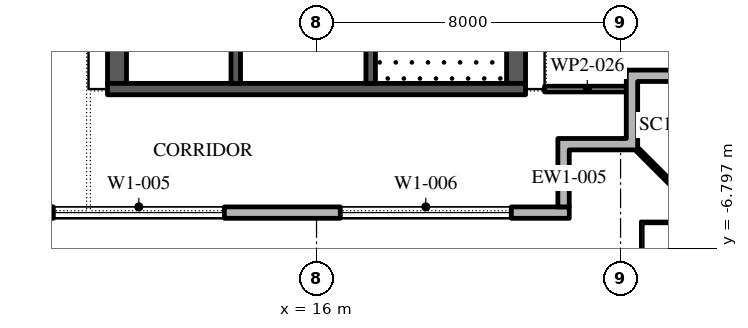
"""IFC4 building model, lengths in metres.
Left out: names, types, materials, properties, quantities, classifications, styles, units other than length and angle.
Written with IfcOpenShell. Run it as: python <this file> out.ifc"""

import sys

from ifc_helpers import new_model, si_unit, direction, frame, frame_2d, origin, place, context, subcontext, project, spatial, polyline, rectangle, outline, extrude, element, fill, save


model = new_model("IFC4")
c1 = context("Model", 3, precision=1e-05, world=origin(), true_north=direction((0.0, 1.0)))
c2 = subcontext(c1, "Body", "Model", "MODEL_VIEW")
j1 = project(units=[si_unit("LENGTHUNIT", "METRE"), si_unit("PLANEANGLEUNIT", "RADIAN")], contexts=[c1])
p1 = place(None, origin())
s1 = spatial("IfcSite", under=j1, at=p1, CompositionType="ELEMENT")
p2 = place(p1, origin())
s2 = spatial("IfcBuilding", under=s1, at=p2, CompositionType="ELEMENT")
p3 = place(p2, frame((0.0, 0.0, 317.4)))
s3 = spatial("IfcBuildingStorey", under=s2, at=p3, CompositionType="ELEMENT", Elevation=317.4)
p4 = place(p3, frame((-22.35, -5.85, 0.0), z_axis=(0.0, 0.0, 1.0), x_axis=(1.0, 0.0, 0.0)))
e1 = element("IfcWall", 1, at=p4, inside=s3, PredefinedType="STANDARD", context=c2, shape_type="SweptSolid", body=[
    extrude(rectangle(XDim=45.0, YDim=0.3, at=frame_2d((22.5, 0.0))), origin(), (0.0, 0.0, 1.0), 4.0),
])
p5 = place(p4, frame((1.375, 0.0, 0.45)))
e2 = element("IfcOpeningElement", 2, at=p5, cuts=e1, PredefinedType="OPENING", context=c2, shape_type="SweptSolid", body=[
    extrude(rectangle(XDim=4.5, YDim=3.05, at=frame_2d((2.25, 1.525))), frame((0.0, 0.16, 0.0), z_axis=(0.0, -1.0, 0.0), x_axis=(1.0, 0.0, 0.0)), (0.0, 0.0, 1.0), 0.32),
])
p6 = place(p4, frame((8.775, 0.0, 0.45)))
e3 = element("IfcOpeningElement", 3, at=p6, cuts=e1, PredefinedType="OPENING", context=c2, shape_type="SweptSolid", body=[
    extrude(rectangle(XDim=4.5, YDim=3.05, at=frame_2d((2.25, 1.525))), frame((0.0, 0.16, 0.0), z_axis=(0.0, -1.0, 0.0), x_axis=(1.0, 0.0, 0.0)), (0.0, 0.0, 1.0), 0.32),
])
p7 = place(p4, frame((17.375, 0.0, 0.0)))
e4 = element("IfcOpeningElement", 4, at=p7, cuts=e1, PredefinedType="OPENING", context=c2, shape_type="SweptSolid", body=[
    extrude(rectangle(XDim=2.4, YDim=3.5, at=frame_2d((1.2, 1.75))), frame((0.0, 0.16, 0.0), z_axis=(0.0, -1.0, 0.0), x_axis=(1.0, 0.0, 0.0)), (0.0, 0.0, 1.0), 0.32),
])
p8 = place(p4, frame((23.875, 0.0, 0.45)))
e5 = element("IfcOpeningElement", 5, at=p8, cuts=e1, PredefinedType="OPENING", context=c2, shape_type="SweptSolid", body=[
    extrude(rectangle(XDim=4.5, YDim=3.05, at=frame_2d((2.25, 1.525))), frame((0.0, 0.16, 0.0), z_axis=(0.0, -1.0, 0.0), x_axis=(1.0, 0.0, 0.0)), (0.0, 0.0, 1.0), 0.32),
])
p9 = place(p4, frame((31.425, 0.0, 0.45)))
e6 = element("IfcOpeningElement", 6, at=p9, cuts=e1, PredefinedType="OPENING", context=c2, shape_type="SweptSolid", body=[
    extrude(rectangle(XDim=4.5, YDim=3.05, at=frame_2d((2.25, 1.525))), frame((0.0, 0.16, 0.0), z_axis=(0.0, -1.0, 0.0), x_axis=(1.0, 0.0, 0.0)), (0.0, 0.0, 1.0), 0.32),
])
p10 = place(p4, frame((38.975, 0.0, 0.45)))
e7 = element("IfcOpeningElement", 7, at=p10, cuts=e1, PredefinedType="OPENING", context=c2, shape_type="SweptSolid", body=[
    extrude(rectangle(XDim=4.5, YDim=3.05, at=frame_2d((2.25, 1.525))), frame((0.0, 0.16, 0.0), z_axis=(0.0, -1.0, 0.0), x_axis=(1.0, 0.0, 0.0)), (0.0, 0.0, 1.0), 0.32),
])
p11 = place(p3, origin())
e8 = element("IfcWall", 8, at=p11, inside=s3, PredefinedType="STANDARD", context=c2, shape_type="SweptSolid", body=[
    extrude(outline(polyline([(24.15, -3.9), (24.15, -2.1), (26.25, -2.1), (26.25, -2.4), (24.45, -2.4), (24.45, -4.2), (22.65, -4.2), (22.65, -5.7), (22.35, -5.7), (22.35, -3.9), (24.15, -3.9)])), origin(), (0.0, 0.0, 1.0), 4.0),
])
p12 = place(p3, frame((24.45, -4.2, -0.05), z_axis=(0.0, 0.0, 1.0), x_axis=(0.707106781187, -0.707106781187, 0.0)))
e9 = element("IfcWall", 9, at=p12, inside=s3, PredefinedType="STANDARD", context=c2, shape_type="SweptSolid", body=[
    extrude(rectangle(XDim=2.667, YDim=0.1, at=frame_2d((1.333, 0.0))), origin(), (0.0, 0.0, 1.0), 4.05),
])
p13 = place(p3, frame((21.25, -2.45, 0.0), z_axis=(0.0, 0.0, 1.0), x_axis=(0.0, 1.0, 0.0)))
e10 = element("IfcWall", 10, at=p13, inside=s3, PredefinedType="SHEAR", context=c2, shape_type="SweptSolid", body=[
    extrude(rectangle(XDim=27.9, YDim=0.5, at=frame_2d((13.95, 0.0))), origin(), (0.0, 0.0, 1.0), 4.0),
])
p14 = place(p13, frame((5.05, 0.0, 0.0)))
e11 = element("IfcOpeningElement", 11, at=p14, cuts=e10, PredefinedType="OPENING", context=c2, shape_type="SweptSolid", body=[
    extrude(rectangle(XDim=1.2, YDim=2.1, at=frame_2d((0.6, 1.05))), frame((0.0, 0.26, 0.0), z_axis=(0.0, -1.0, 0.0), x_axis=(1.0, 0.0, 0.0)), (0.0, 0.0, 1.0), 0.52),
])
p15 = place(p13, frame((21.65, 0.0, 0.0)))
e12 = element("IfcOpeningElement", 12, at=p15, cuts=e10, PredefinedType="OPENING", context=c2, shape_type="SweptSolid", body=[
    extrude(rectangle(XDim=1.2, YDim=2.1, at=frame_2d((0.6, 1.05))), frame((0.0, 0.26, 0.0), z_axis=(0.0, -1.0, 0.0), x_axis=(1.0, 0.0, 0.0)), (0.0, 0.0, 1.0), 0.52),
])
p16 = place(p3, frame((10.75, -2.45, 0.0), z_axis=(0.0, 0.0, 1.0), x_axis=(0.0, 1.0, 0.0)))
e13 = element("IfcWall", 13, at=p16, inside=s3, PredefinedType="SHEAR", context=c2, shape_type="SweptSolid", body=[
    extrude(rectangle(XDim=27.9, YDim=0.5, at=frame_2d((13.95, 0.0))), origin(), (0.0, 0.0, 1.0), 4.0),
])
p17 = place(p16, frame((23.65, 0.0, 0.0)))
e14 = element("IfcOpeningElement", 14, at=p17, cuts=e13, PredefinedType="OPENING", context=c2, shape_type="SweptSolid", body=[
    extrude(rectangle(XDim=2.4, YDim=2.1, at=frame_2d((1.2, 1.05))), frame((0.0, 0.26, 0.0), z_axis=(0.0, -1.0, 0.0), x_axis=(1.0, 0.0, 0.0)), (0.0, 0.0, 1.0), 0.52),
])
p18 = place(p16, frame((1.087, 0.0, 0.0)))
e15 = element("IfcOpeningElement", 15, at=p18, cuts=e13, PredefinedType="OPENING", context=c2, shape_type="SweptSolid", body=[
    extrude(rectangle(XDim=0.9, YDim=2.1, at=frame_2d((0.45, 1.05))), frame((0.0, 0.26, 0.0), z_axis=(0.0, -1.0, 0.0), x_axis=(1.0, 0.0, 0.0)), (0.0, 0.0, 1.0), 0.52),
])
p19 = place(p16, frame((4.262, 0.0, 0.0)))
e16 = element("IfcOpeningElement", 16, at=p19, cuts=e13, PredefinedType="OPENING", context=c2, shape_type="SweptSolid", body=[
    extrude(rectangle(XDim=1.0, YDim=2.1, at=frame_2d((0.5, 1.05))), frame((0.0, 0.26, 0.0), z_axis=(0.0, -1.0, 0.0), x_axis=(1.0, 0.0, 0.0)), (0.0, 0.0, 1.0), 0.52),
])
p20 = place(p3, frame((10.5, -2.6, 0.0), z_axis=(0.0, 0.0, 1.0), x_axis=(1.0, 0.0, 0.0)))
e17 = element("IfcWall", 17, at=p20, inside=s3, PredefinedType="SHEAR", context=c2, shape_type="SweptSolid", body=[
    extrude(rectangle(XDim=11.0, YDim=0.3, at=frame_2d((5.5, 0.0))), origin(), (0.0, 0.0, 1.0), 4.0),
])
p21 = place(p3, frame((17.425, -2.45, 0.0), z_axis=(0.0, 0.0, 1.0), x_axis=(0.0, 1.0, 0.0)))
e18 = element("IfcWall", 18, at=p21, inside=s3, PredefinedType="SHEAR", context=c2, shape_type="SweptSolid", body=[
    extrude(rectangle(XDim=6.3, YDim=0.25, at=frame_2d((3.15, 0.0))), origin(), (0.0, 0.0, 1.0), 4.0),
])
p22 = place(p21, frame((5.05, 0.0, 0.0)))
e19 = element("IfcOpeningElement", 19, at=p22, cuts=e18, PredefinedType="OPENING", context=c2, shape_type="SweptSolid", body=[
    extrude(rectangle(XDim=1.2, YDim=2.1, at=frame_2d((0.6, 1.05))), frame((0.0, 0.135, 0.0), z_axis=(0.0, -1.0, 0.0), x_axis=(1.0, 0.0, 0.0)), (0.0, 0.0, 1.0), 0.27),
])
p23 = place(p3, frame((13.875, -2.45, 0.0), z_axis=(0.0, 0.0, 1.0), x_axis=(0.0, 1.0, 0.0)))
e20 = element("IfcWall", 20, at=p23, inside=s3, PredefinedType="SHEAR", context=c2, shape_type="SweptSolid", body=[
    extrude(rectangle(XDim=21.3, YDim=0.25, at=frame_2d((10.65, 0.0))), origin(), (0.0, 0.0, 1.0), 4.0),
])
p24 = place(p23, frame((11.357, 0.0, 0.0)))
e21 = element("IfcOpeningElement", 21, at=p24, cuts=e20, PredefinedType="OPENING", context=c2, shape_type="SweptSolid", body=[
    extrude(rectangle(XDim=0.9, YDim=2.1, at=frame_2d((0.45, 1.05))), frame((0.0, 0.135, 0.0), z_axis=(0.0, -1.0, 0.0), x_axis=(1.0, 0.0, 0.0)), (0.0, 0.0, 1.0), 0.27),
])
p25 = place(p23, frame((6.971, 0.0, 0.0)))
e22 = element("IfcOpeningElement", 22, at=p25, cuts=e20, PredefinedType="OPENING", context=c2, shape_type="SweptSolid", body=[
    extrude(rectangle(XDim=1.1, YDim=2.1, at=frame_2d((0.55, 1.05))), frame((0.0, 0.135, 0.0), z_axis=(0.0, -1.0, 0.0), x_axis=(1.0, 0.0, 0.0)), (0.0, 0.0, 1.0), 0.27),
])
p26 = place(p23, frame((15.543, 0.0, 0.0)))
e23 = element("IfcOpeningElement", 23, at=p26, cuts=e20, PredefinedType="OPENING", context=c2, shape_type="SweptSolid", body=[
    extrude(rectangle(XDim=1.1, YDim=2.1, at=frame_2d((0.55, 1.05))), frame((0.0, 0.135, 0.0), z_axis=(0.0, -1.0, 0.0), x_axis=(1.0, 0.0, 0.0)), (0.0, 0.0, 1.0), 0.27),
])
p27 = place(p23, frame((17.686, 0.0, 0.0)))
e24 = element("IfcOpeningElement", 24, at=p27, cuts=e20, PredefinedType="OPENING", context=c2, shape_type="SweptSolid", body=[
    extrude(rectangle(XDim=1.1, YDim=2.1, at=frame_2d((0.55, 1.05))), frame((0.0, 0.135, 0.0), z_axis=(0.0, -1.0, 0.0), x_axis=(1.0, 0.0, 0.0)), (0.0, 0.0, 1.0), 0.27),
])
p28 = place(p23, frame((19.829, 0.0, 0.0)))
e25 = element("IfcOpeningElement", 25, at=p28, cuts=e20, PredefinedType="OPENING", context=c2, shape_type="SweptSolid", body=[
    extrude(rectangle(XDim=1.1, YDim=2.1, at=frame_2d((0.55, 1.05))), frame((0.0, 0.135, 0.0), z_axis=(0.0, -1.0, 0.0), x_axis=(1.0, 0.0, 0.0)), (0.0, 0.0, 1.0), 0.27),
])
p29 = place(p3, frame((22.0, -2.6, 0.0), z_axis=(0.0, 0.0, 1.0), x_axis=(1.0, 0.0, 0.0)))
e26 = element("IfcWall", 26, at=p29, inside=s3, PredefinedType="PARTITIONING", context=c2, shape_type="SweptSolid", body=[
    extrude(rectangle(XDim=2.25, YDim=0.15, at=frame_2d((1.125, 0.0))), origin(), (0.0, 0.0, 1.0), 4.0),
])
p30 = place(p9, origin())
e27 = element("IfcWindow", 27, at=p30, inside=s3, PartitioningType="DOUBLE_PANEL_VERTICAL", PredefinedType="WINDOW", context=c2, shape_type="SweptSolid", body=[
    extrude(rectangle(XDim=4.5, YDim=3.05, at=frame_2d((2.25, 1.525))), frame((0.0, 0.03, 0.0), z_axis=(0.0, -1.0, 0.0), x_axis=(1.0, 0.0, 0.0)), (0.0, 0.0, 1.0), 0.06),
])
fill(e6, e27)
p31 = place(p10, origin())
e28 = element("IfcWindow", 28, at=p31, inside=s3, PartitioningType="DOUBLE_PANEL_VERTICAL", PredefinedType="WINDOW", context=c2, shape_type="SweptSolid", body=[
    extrude(rectangle(XDim=4.5, YDim=3.05, at=frame_2d((2.25, 1.525))), frame((0.0, 0.03, 0.0), z_axis=(0.0, -1.0, 0.0), x_axis=(1.0, 0.0, 0.0)), (0.0, 0.0, 1.0), 0.06),
])
fill(e7, e28)
save(model, sys.argv[1])
